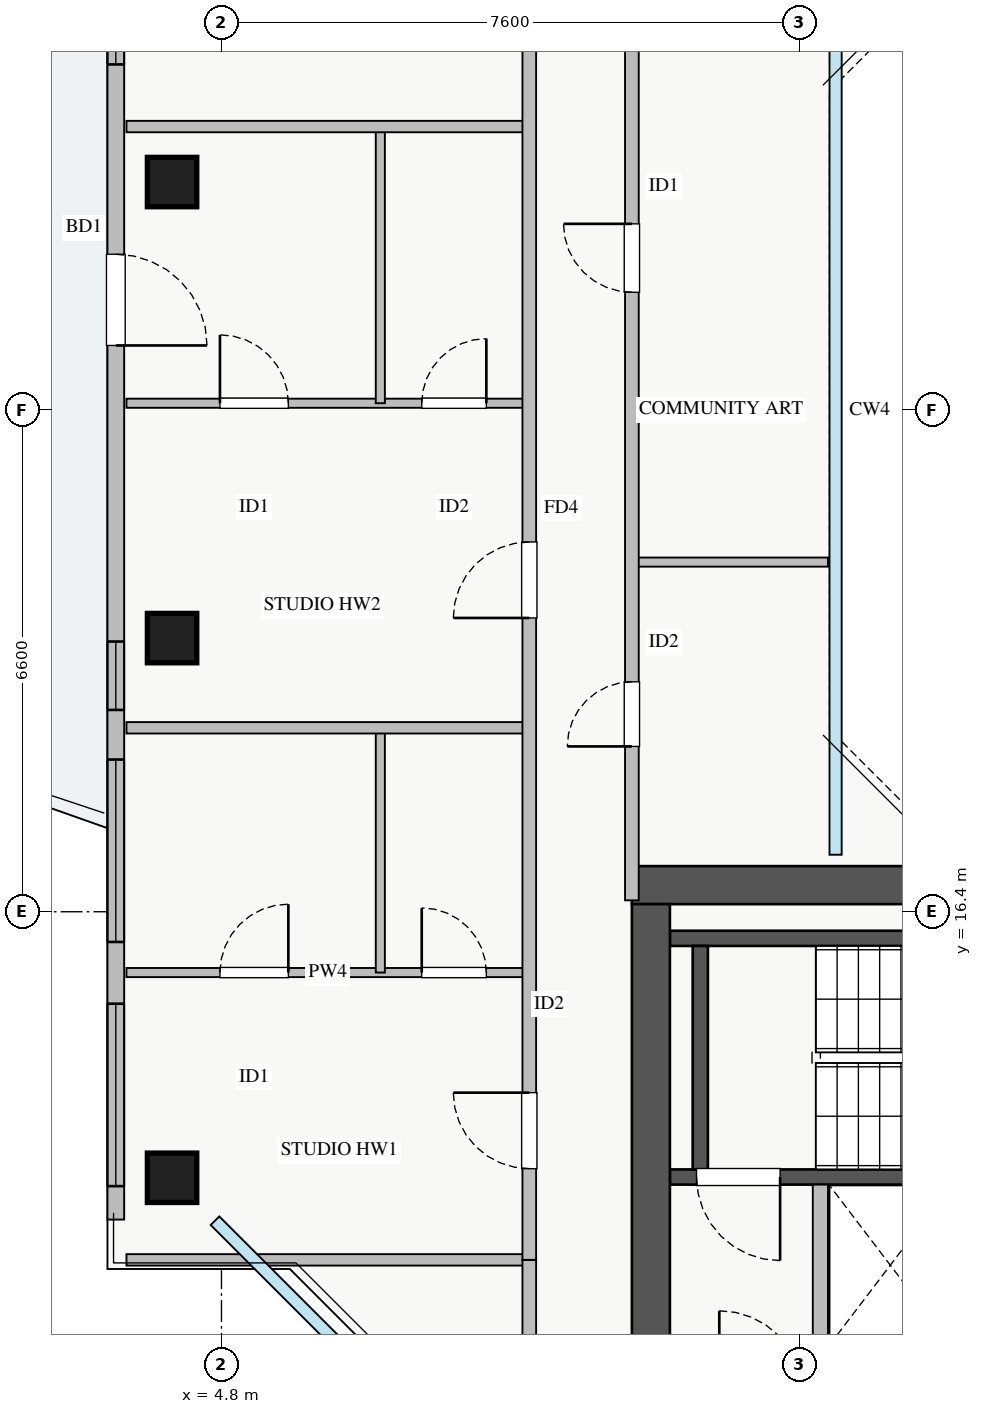
"""IFC4 building model, lengths in metres.
Left out: names, types, materials, properties, quantities, classifications, styles, units other than length and angle.
Written with IfcOpenShell. Run it as: python <this file> out.ifc"""

import sys

from ifc_helpers import new_model, si_unit, direction, frame, frame_2d, origin, origin_2d, place, context, subcontext, project, spatial, rectangle, extrude, source, transform, mapped, element, fill, save


model = new_model("IFC4")
c1 = context("Model", 3, precision=1e-05, world=origin(), true_north=direction((0.0, 1.0)))
c2 = subcontext(c1, "Body", "Model", "MODEL_VIEW")
j1 = project(units=[si_unit("LENGTHUNIT", "METRE"), si_unit("PLANEANGLEUNIT", "RADIAN")], contexts=[c1])
p1 = place(None, origin())
s1 = spatial("IfcSite", under=j1, at=p1, CompositionType="ELEMENT")
p2 = place(p1, origin())
s2 = spatial("IfcBuilding", under=s1, at=p2, CompositionType="ELEMENT")
p3 = place(p2, frame((0.0, 0.0, 260.0)))
s3 = spatial("IfcBuildingStorey", under=s2, at=p3, CompositionType="ELEMENT", Elevation=260.0)
p4 = place(p3, frame((12.68, 12.8, 0.0), z_axis=(0.0, 0.0, 1.0), x_axis=(1.0, 0.0, 0.0)))
e1 = element("IfcWall", 1, at=p4, inside=s3, PredefinedType="SHEAR", context=c2, shape_type="SweptSolid", body=[
    extrude(rectangle(XDim=1.94, YDim=0.18, at=frame_2d((0.97, 0.0))), origin(), (0.0, 0.0, 1.0), 3.03),
])
p5 = place(p3, frame((10.7, 12.91, 0.0), z_axis=(0.0, 0.0, 1.0), x_axis=(1.0, 0.0, 0.0)))
e2 = element("IfcWall", 2, at=p5, inside=s3, PredefinedType="SHEAR", context=c2, shape_type="SweptSolid", body=[
    extrude(rectangle(XDim=7.45, YDim=0.2, at=frame_2d((3.725, 0.0))), origin(), (0.0, 0.0, 1.0), 3.25),
])
p6 = place(p5, frame((0.35, 0.0, 0.0)))
e3 = element("IfcOpeningElement", 3, at=p6, cuts=e2, PredefinedType="OPENING", context=c2, shape_type="SweptSolid", body=[
    extrude(rectangle(XDim=1.1, YDim=2.05, at=frame_2d((0.55, 1.025))), frame((0.0, 0.11, 0.0), z_axis=(0.0, -1.0, 0.0), x_axis=(1.0, 0.0, 0.0)), (0.0, 0.0, 1.0), 0.22),
])
p7 = place(p3, frame((10.7, 16.05, 0.0), z_axis=(0.0, 0.0, 1.0), x_axis=(1.0, 0.0, 0.0)))
e4 = element("IfcWall", 4, at=p7, inside=s3, PredefinedType="SHEAR", context=c2, shape_type="SweptSolid", body=[
    extrude(rectangle(XDim=7.45, YDim=0.2, at=frame_2d((3.725, 0.0))), origin(), (0.0, 0.0, 1.0), 3.25),
])
p8 = place(p3, frame((11.1, 13.01, 0.0), z_axis=(0.0, 0.0, 1.0), x_axis=(0.0, 1.0, 0.0)))
e5 = element("IfcWall", 5, at=p8, inside=s3, PredefinedType="SHEAR", context=c2, shape_type="SweptSolid", body=[
    extrude(rectangle(XDim=2.94, YDim=0.2, at=frame_2d((1.47, 0.0))), origin(), (0.0, 0.0, 1.0), 3.25),
])
p9 = place(p3, frame((10.2, 16.75, 0.0), z_axis=(0.0, 0.0, 1.0), x_axis=(1.0, 0.0, 0.0)))
e6 = element("IfcWall", 6, at=p9, inside=s3, PredefinedType="SHEAR", context=c2, shape_type="SweptSolid", body=[
    extrude(rectangle(XDim=17.6, YDim=0.5, at=frame_2d((8.8, 0.0))), origin(), (0.0, 0.0, 1.0), 3.25),
])
p10 = place(p3, frame((10.45, 10.3, 0.0), z_axis=(0.0, 0.0, 1.0), x_axis=(0.0, 1.0, 0.0)))
e7 = element("IfcWall", 7, at=p10, inside=s3, PredefinedType="SHEAR", context=c2, shape_type="SweptSolid", body=[
    extrude(rectangle(XDim=6.2, YDim=0.5, at=frame_2d((3.1, 0.0))), origin(), (0.0, 0.0, 1.0), 3.25),
])
m1 = source(origin(), c2, "Body", "SweptSolid", [
    extrude(rectangle(XDim=0.65, YDim=0.65, at=origin_2d()), origin(), (0.0, 0.0, 1.0), 3.25),
])
for number, where, z_axis, x_axis in (
    (8, (4.15, 26.0, 0.0), (0.0, 0.0, 1.0), (1.0, 0.0, 0.0)),
    (9, (4.15, 20.0, 0.0), (0.0, 0.0, 1.0), (1.0, 0.0, 0.0)),
    (10, (4.15, 12.9, 0.0), (0.0, 0.0, 1.0), (1.0, 0.0, 0.0)),
):
    element("IfcColumn", number, at=place(p3, frame(where, z_axis=z_axis, x_axis=x_axis)), inside=s3, PredefinedType="COLUMN", context=c2, shape_type="MappedRepresentation", body=[
        mapped(m1, transform((0.0, 0.0, 0.0), x_axis=(1.0, 0.0, 0.0), y_axis=(0.0, 1.0, 0.0), z_axis=(0.0, 0.0, 1.0), scale=1.0)),
    ])
p11 = place(p3, frame((3.41, 12.35, 0.0), z_axis=(0.0, 0.0, 1.0), x_axis=(0.0, 1.0, 0.0)))
e11 = element("IfcWall", 11, at=p11, inside=s3, PredefinedType="STANDARD", context=c2, shape_type="SweptSolid", body=[
    extrude(rectangle(XDim=21.3, YDim=0.22, at=frame_2d((10.65, 0.0))), origin(), (0.0, 0.0, 1.0), 2.57),
])
p12 = place(p11, frame((11.5, 0.0, 0.0)))
e12 = element("IfcOpeningElement", 12, at=p12, cuts=e11, PredefinedType="OPENING", context=c2, shape_type="SweptSolid", body=[
    extrude(rectangle(XDim=1.2, YDim=2.1, at=frame_2d((0.6, 1.05))), frame((0.0, 0.12, 0.0), z_axis=(0.0, -1.0, 0.0), x_axis=(1.0, 0.0, 0.0)), (0.0, 0.0, 1.0), 0.24),
])
p13 = place(p11, frame((0.44, 0.0, 0.9)))
e13 = element("IfcOpeningElement", 13, at=p13, cuts=e11, PredefinedType="OPENING", context=c2, shape_type="SweptSolid", body=[
    extrude(rectangle(XDim=2.4, YDim=1.5, at=frame_2d((1.2, 0.75))), frame((0.0, 0.12, 0.0), z_axis=(0.0, -1.0, 0.0), x_axis=(1.0, 0.0, 0.0)), (0.0, 0.0, 1.0), 0.24),
])
p14 = place(p11, frame((18.785, 0.0, 0.9)))
e14 = element("IfcOpeningElement", 14, at=p14, cuts=e11, PredefinedType="OPENING", context=c2, shape_type="SweptSolid", body=[
    extrude(rectangle(XDim=2.1, YDim=1.5, at=frame_2d((1.05, 0.75))), frame((0.0, 0.12, 0.0), z_axis=(0.0, -1.0, 0.0), x_axis=(1.0, 0.0, 0.0)), (0.0, 0.0, 1.0), 0.24),
])
p15 = place(p11, frame((3.653, 0.0, 0.9)))
e15 = element("IfcOpeningElement", 15, at=p15, cuts=e11, PredefinedType="OPENING", context=c2, shape_type="SweptSolid", body=[
    extrude(rectangle(XDim=2.4, YDim=1.5, at=frame_2d((1.2, 0.75))), frame((0.0, 0.12, 0.0), z_axis=(0.0, -1.0, 0.0), x_axis=(1.0, 0.0, 0.0)), (0.0, 0.0, 1.0), 0.24),
])
p16 = place(p11, frame((15.198, 0.0, 0.9)))
e16 = element("IfcOpeningElement", 16, at=p16, cuts=e11, PredefinedType="OPENING", context=c2, shape_type="SweptSolid", body=[
    extrude(rectangle(XDim=2.4, YDim=1.5, at=frame_2d((1.2, 0.75))), frame((0.0, 0.12, 0.0), z_axis=(0.0, -1.0, 0.0), x_axis=(1.0, 0.0, 0.0)), (0.0, 0.0, 1.0), 0.24),
])
p17 = place(p11, frame((6.705, 0.0, 0.9)))
e17 = element("IfcOpeningElement", 17, at=p17, cuts=e11, PredefinedType="OPENING", context=c2, shape_type="SweptSolid", body=[
    extrude(rectangle(XDim=0.9, YDim=1.2, at=frame_2d((0.45, 0.6))), frame((0.0, 0.12, 0.0), z_axis=(0.0, -1.0, 0.0), x_axis=(1.0, 0.0, 0.0)), (0.0, 0.0, 1.0), 0.24),
])
p18 = place(p3, frame((12.68, 10.6, 0.0), z_axis=(0.0, 0.0, 1.0), x_axis=(0.0, 1.0, 0.0)))
e18 = element("IfcWall", 18, at=p18, inside=s3, PredefinedType="PARTITIONING", context=c2, shape_type="SweptSolid", body=[
    extrude(rectangle(XDim=2.21, YDim=0.2, at=frame_2d((1.105, 0.0))), origin(), (0.0, 0.0, 1.0), 3.03),
])
p19 = place(p3, frame((3.55, 11.82, 0.0), z_axis=(0.0, 0.0, 1.0), x_axis=(1.0, 0.0, 0.0)))
e19 = element("IfcWall", 19, at=p19, inside=s3, PredefinedType="PARTITIONING", context=c2, shape_type="SweptSolid", body=[
    extrude(rectangle(XDim=5.3, YDim=0.15, at=frame_2d((2.65, 0.0))), origin(), (0.0, 0.0, 1.0), 3.03),
])
p20 = place(p3, frame((8.85, 8.56, 0.0), z_axis=(0.0, 0.0, 1.0), x_axis=(0.0, 1.0, 0.0)))
e20 = element("IfcWall", 20, at=p20, inside=s3, PredefinedType="PARTITIONING", context=c2, shape_type="SweptSolid", body=[
    extrude(rectangle(XDim=3.26, YDim=0.18, at=frame_2d((1.63, 0.0))), origin(), (0.0, 0.0, 1.0), 2.529),
])
p21 = place(p3, frame((3.55, 15.6, 0.0), z_axis=(0.0, 0.0, 1.0), x_axis=(1.0, 0.0, 0.0)))
e21 = element("IfcWall", 21, at=p21, inside=s3, PredefinedType="PLUMBINGWALL", context=c2, shape_type="SweptSolid", body=[
    extrude(rectangle(XDim=5.3, YDim=0.12, at=frame_2d((2.65, 0.0))), origin(), (0.0, 0.0, 1.0), 3.03),
])
p22 = place(p21, frame((1.23, 0.0, 0.0)))
e22 = element("IfcOpeningElement", 22, at=p22, cuts=e21, PredefinedType="OPENING", context=c2, shape_type="SweptSolid", body=[
    extrude(rectangle(XDim=0.9, YDim=2.05, at=frame_2d((0.45, 1.025))), frame((0.0, 0.07, 0.0), z_axis=(0.0, -1.0, 0.0), x_axis=(1.0, 0.0, 0.0)), (0.0, 0.0, 1.0), 0.14),
])
p23 = place(p21, frame((3.885, 0.0, 0.0)))
e23 = element("IfcOpeningElement", 23, at=p23, cuts=e21, PredefinedType="OPENING", context=c2, shape_type="SweptSolid", body=[
    extrude(rectangle(XDim=0.85, YDim=2.05, at=frame_2d((0.425, 1.025))), frame((0.0, 0.07, 0.0), z_axis=(0.0, -1.0, 0.0), x_axis=(1.0, 0.0, 0.0)), (0.0, 0.0, 1.0), 0.14),
])
p24 = place(p3, frame((6.89, 15.6, 0.0), z_axis=(0.0, 0.0, 1.0), x_axis=(0.0, 1.0, 0.0)))
e24 = element("IfcWall", 24, at=p24, inside=s3, PredefinedType="PLUMBINGWALL", context=c2, shape_type="SweptSolid", body=[
    extrude(rectangle(XDim=3.22, YDim=0.12, at=frame_2d((1.61, 0.0))), origin(), (0.0, 0.0, 1.0), 3.03),
])
p25 = place(p3, frame((3.55, 23.09, 0.0), z_axis=(0.0, 0.0, 1.0), x_axis=(1.0, 0.0, 0.0)))
e25 = element("IfcWall", 25, at=p25, inside=s3, PredefinedType="PLUMBINGWALL", context=c2, shape_type="SweptSolid", body=[
    extrude(rectangle(XDim=5.3, YDim=0.12, at=frame_2d((2.65, 0.0))), origin(), (0.0, 0.0, 1.0), 3.03),
])
p26 = place(p25, frame((1.23, 0.0, 0.0)))
e26 = element("IfcOpeningElement", 26, at=p26, cuts=e25, PredefinedType="OPENING", context=c2, shape_type="SweptSolid", body=[
    extrude(rectangle(XDim=0.9, YDim=2.05, at=frame_2d((0.45, 1.025))), frame((0.0, 0.07, 0.0), z_axis=(0.0, -1.0, 0.0), x_axis=(1.0, 0.0, 0.0)), (0.0, 0.0, 1.0), 0.14),
])
p27 = place(p25, frame((3.885, 0.0, 0.0)))
e27 = element("IfcOpeningElement", 27, at=p27, cuts=e25, PredefinedType="OPENING", context=c2, shape_type="SweptSolid", body=[
    extrude(rectangle(XDim=0.85, YDim=2.05, at=frame_2d((0.425, 1.025))), frame((0.0, 0.07, 0.0), z_axis=(0.0, -1.0, 0.0), x_axis=(1.0, 0.0, 0.0)), (0.0, 0.0, 1.0), 0.14),
])
p28 = place(p3, frame((6.89, 23.09, 0.0), z_axis=(0.0, 0.0, 1.0), x_axis=(0.0, 1.0, 0.0)))
e28 = element("IfcWall", 28, at=p28, inside=s3, PredefinedType="PLUMBINGWALL", context=c2, shape_type="SweptSolid", body=[
    extrude(rectangle(XDim=3.64, YDim=0.12, at=frame_2d((1.82, 0.0))), origin(), (0.0, 0.0, 1.0), 3.03),
])
for number, where, z_axis, x_axis in (
    (29, (3.55, 18.82, 0.0), (0.0, 0.0, 1.0), (1.0, 0.0, 0.0)),
    (30, (3.55, 26.73, 0.0), (0.0, 0.0, 1.0), (1.0, 0.0, 0.0)),
):
    element("IfcWall", number, at=place(p3, frame(where, z_axis=z_axis, x_axis=x_axis)), inside=s3, PredefinedType="PARTITIONING", context=c2, shape_type="SweptSolid", body=[
        extrude(rectangle(XDim=5.3, YDim=0.15, at=frame_2d((2.65, 0.0))), origin(), (0.0, 0.0, 1.0), 3.03),
    ])
p29 = place(p3, frame((8.85, 11.82, 0.0), z_axis=(0.0, 0.0, 1.0), x_axis=(0.0, 1.0, 0.0)))
e31 = element("IfcWall", 31, at=p29, inside=s3, PredefinedType="PARTITIONING", context=c2, shape_type="SweptSolid", body=[
    extrude(rectangle(XDim=22.36, YDim=0.18, at=frame_2d((11.18, 0.0))), origin(), (0.0, 0.0, 1.0), 2.529),
])
p30 = place(p29, frame((1.2, 0.0, 0.0)))
e32 = element("IfcOpeningElement", 32, at=p30, cuts=e31, PredefinedType="OPENING", context=c2, shape_type="SweptSolid", body=[
    extrude(rectangle(XDim=1.0, YDim=2.05, at=frame_2d((0.5, 1.025))), frame((0.0, 0.1, 0.0), z_axis=(0.0, -1.0, 0.0), x_axis=(1.0, 0.0, 0.0)), (0.0, 0.0, 1.0), 0.2),
])
p31 = place(p29, frame((8.445, 0.0, 0.0)))
e33 = element("IfcOpeningElement", 33, at=p31, cuts=e31, PredefinedType="OPENING", context=c2, shape_type="SweptSolid", body=[
    extrude(rectangle(XDim=1.0, YDim=2.05, at=frame_2d((0.5, 1.025))), frame((0.0, 0.1, 0.0), z_axis=(0.0, -1.0, 0.0), x_axis=(1.0, 0.0, 0.0)), (0.0, 0.0, 1.0), 0.2),
])
p32 = place(p29, frame((16.23, 0.0, 0.0)))
e34 = element("IfcOpeningElement", 34, at=p32, cuts=e31, PredefinedType="OPENING", context=c2, shape_type="SweptSolid", body=[
    extrude(rectangle(XDim=1.0, YDim=2.05, at=frame_2d((0.5, 1.025))), frame((0.0, 0.1, 0.0), z_axis=(0.0, -1.0, 0.0), x_axis=(1.0, 0.0, 0.0)), (0.0, 0.0, 1.0), 0.2),
])
p33 = place(p3, frame((10.2, 21.0, 0.0), z_axis=(0.0, 0.0, 1.0), x_axis=(1.0, 0.0, 0.0)))
e35 = element("IfcWall", 35, at=p33, inside=s3, PredefinedType="PLUMBINGWALL", context=c2, shape_type="SweptSolid", body=[
    extrude(rectangle(XDim=2.58, YDim=0.12, at=frame_2d((1.29, 0.0))), origin(), (0.0, 0.0, 1.0), 3.03),
])
p34 = place(p3, frame((10.2, 16.55, 0.0), z_axis=(0.0, 0.0, 1.0), x_axis=(0.0, 1.0, 0.0)))
e36 = element("IfcWall", 36, at=p34, inside=s3, PredefinedType="PARTITIONING", context=c2, shape_type="SweptSolid", body=[
    extrude(rectangle(XDim=12.9, YDim=0.18, at=frame_2d((6.45, 0.0))), origin(), (0.0, 0.0, 1.0), 3.03),
])
p35 = place(p34, frame((2.025, 0.0, 0.0)))
e37 = element("IfcOpeningElement", 37, at=p35, cuts=e36, PredefinedType="OPENING", context=c2, shape_type="SweptSolid", body=[
    extrude(rectangle(XDim=0.85, YDim=2.05, at=frame_2d((0.425, 1.025))), frame((0.0, 0.1, 0.0), z_axis=(0.0, -1.0, 0.0), x_axis=(1.0, 0.0, 0.0)), (0.0, 0.0, 1.0), 0.2),
])
p36 = place(p34, frame((8.0, 0.0, 0.0)))
e38 = element("IfcOpeningElement", 38, at=p36, cuts=e36, PredefinedType="OPENING", context=c2, shape_type="SweptSolid", body=[
    extrude(rectangle(XDim=0.9, YDim=2.05, at=frame_2d((0.45, 1.025))), frame((0.0, 0.1, 0.0), z_axis=(0.0, -1.0, 0.0), x_axis=(1.0, 0.0, 0.0)), (0.0, 0.0, 1.0), 0.2),
])
m2 = source(origin(), c2, "Body", "SweptSolid", [
    extrude(rectangle(XDim=1.2, YDim=2.1, at=frame_2d((0.6, 1.05))), frame((0.0, 0.025, 0.0), z_axis=(0.0, -1.0, 0.0), x_axis=(1.0, 0.0, 0.0)), (0.0, 0.0, 1.0), 0.05),
])
p37 = place(p12, frame((1.2, 0.0, 0.0), z_axis=(0.0, 0.0, 1.0), x_axis=(-1.0, 0.0, 0.0)))
e39 = element("IfcDoor", 39, at=p37, inside=s3, OperationType="SINGLE_SWING_LEFT", PredefinedType="DOOR", context=c2, shape_type="MappedRepresentation", body=[
    mapped(m2, transform((0.0, 0.0, 0.0), x_axis=(1.0, 0.0, 0.0), y_axis=(0.0, 1.0, 0.0), z_axis=(0.0, 0.0, 1.0), scale=1.0)),
])
fill(e12, e39)
m3 = source(origin(), c2, "Body", "SweptSolid", [
    extrude(rectangle(XDim=2.4, YDim=1.5, at=frame_2d((1.2, 0.75))), frame((0.0, 0.03, 0.0), z_axis=(0.0, -1.0, 0.0), x_axis=(1.0, 0.0, 0.0)), (0.0, 0.0, 1.0), 0.06),
])
p38 = place(p13, origin())
e40 = element("IfcWindow", 40, at=p38, inside=s3, PartitioningType="TRIPLE_PANEL_VERTICAL", PredefinedType="WINDOW", context=c2, shape_type="MappedRepresentation", body=[
    mapped(m3, transform((0.0, 0.0, 0.0), x_axis=(1.0, 0.0, 0.0), y_axis=(0.0, 1.0, 0.0), z_axis=(0.0, 0.0, 1.0), scale=1.0)),
])
fill(e13, e40)
m4 = source(origin(), c2, "Body", "SweptSolid", [
    extrude(rectangle(XDim=1.1, YDim=2.05, at=frame_2d((0.55, 1.025))), frame((0.0, 0.025, 0.0), z_axis=(0.0, -1.0, 0.0), x_axis=(1.0, 0.0, 0.0)), (0.0, 0.0, 1.0), 0.05),
])
p39 = place(p6, frame((1.1, 0.0, 0.0), z_axis=(0.0, 0.0, 1.0), x_axis=(-1.0, 0.0, 0.0)))
e41 = element("IfcDoor", 41, at=p39, inside=s3, OperationType="SINGLE_SWING_RIGHT", PredefinedType="DOOR", context=c2, shape_type="MappedRepresentation", body=[
    mapped(m4, transform((0.0, 0.0, 0.0), x_axis=(1.0, 0.0, 0.0), y_axis=(0.0, 1.0, 0.0), z_axis=(0.0, 0.0, 1.0), scale=1.0)),
])
fill(e3, e41)
m5 = source(origin(), c2, "Body", "SweptSolid", [
    extrude(rectangle(XDim=0.9, YDim=2.05, at=frame_2d((0.45, 1.025))), frame((0.0, 0.025, 0.0), z_axis=(0.0, -1.0, 0.0), x_axis=(1.0, 0.0, 0.0)), (0.0, 0.0, 1.0), 0.05),
])
p40 = place(p22, origin())
e42 = element("IfcDoor", 42, at=p40, inside=s3, OperationType="SINGLE_SWING_RIGHT", PredefinedType="DOOR", context=c2, shape_type="MappedRepresentation", body=[
    mapped(m5, transform((0.0, 0.0, 0.0), x_axis=(1.0, 0.0, 0.0), y_axis=(0.0, 1.0, 0.0), z_axis=(0.0, 0.0, 1.0), scale=1.0)),
])
fill(e22, e42)
m6 = source(origin(), c2, "Body", "SweptSolid", [
    extrude(rectangle(XDim=0.85, YDim=2.05, at=frame_2d((0.425, 1.025))), frame((0.0, 0.025, 0.0), z_axis=(0.0, -1.0, 0.0), x_axis=(1.0, 0.0, 0.0)), (0.0, 0.0, 1.0), 0.05),
])
p41 = place(p23, origin())
e43 = element("IfcDoor", 43, at=p41, inside=s3, OperationType="SINGLE_SWING_LEFT", PredefinedType="DOOR", context=c2, shape_type="MappedRepresentation", body=[
    mapped(m6, transform((0.0, 0.0, 0.0), x_axis=(1.0, 0.0, 0.0), y_axis=(0.0, 1.0, 0.0), z_axis=(0.0, 0.0, 1.0), scale=1.0)),
])
fill(e23, e43)
p42 = place(p26, origin())
e44 = element("IfcDoor", 44, at=p42, inside=s3, OperationType="SINGLE_SWING_LEFT", PredefinedType="DOOR", context=c2, shape_type="MappedRepresentation", body=[
    mapped(m5, transform((0.0, 0.0, 0.0), x_axis=(1.0, 0.0, 0.0), y_axis=(0.0, 1.0, 0.0), z_axis=(0.0, 0.0, 1.0), scale=1.0)),
])
fill(e26, e44)
p43 = place(p27, origin())
e45 = element("IfcDoor", 45, at=p43, inside=s3, OperationType="SINGLE_SWING_RIGHT", PredefinedType="DOOR", context=c2, shape_type="MappedRepresentation", body=[
    mapped(m6, transform((0.0, 0.0, 0.0), x_axis=(1.0, 0.0, 0.0), y_axis=(0.0, 1.0, 0.0), z_axis=(0.0, 0.0, 1.0), scale=1.0)),
])
fill(e27, e45)
m7 = source(origin(), c2, "Body", "SweptSolid", [
    extrude(rectangle(XDim=1.0, YDim=2.05, at=frame_2d((0.5, 1.025))), frame((0.0, 0.025, 0.0), z_axis=(0.0, -1.0, 0.0), x_axis=(1.0, 0.0, 0.0)), (0.0, 0.0, 1.0), 0.05),
])
p44 = place(p30, origin())
e46 = element("IfcDoor", 46, at=p44, inside=s3, OperationType="SINGLE_SWING_RIGHT", PredefinedType="DOOR", context=c2, shape_type="MappedRepresentation", body=[
    mapped(m7, transform((0.0, 0.0, 0.0), x_axis=(1.0, 0.0, 0.0), y_axis=(0.0, 1.0, 0.0), z_axis=(0.0, 0.0, 1.0), scale=1.0)),
])
fill(e32, e46)
p45 = place(p31, origin())
e47 = element("IfcDoor", 47, at=p45, inside=s3, OperationType="SINGLE_SWING_LEFT", PredefinedType="DOOR", context=c2, shape_type="MappedRepresentation", body=[
    mapped(m7, transform((0.0, 0.0, 0.0), x_axis=(1.0, 0.0, 0.0), y_axis=(0.0, 1.0, 0.0), z_axis=(0.0, 0.0, 1.0), scale=1.0)),
])
fill(e33, e47)
p46 = place(p35, origin())
e48 = element("IfcDoor", 48, at=p46, inside=s3, OperationType="SINGLE_SWING_LEFT", PredefinedType="DOOR", context=c2, shape_type="MappedRepresentation", body=[
    mapped(m6, transform((0.0, 0.0, 0.0), x_axis=(1.0, 0.0, 0.0), y_axis=(0.0, 1.0, 0.0), z_axis=(0.0, 0.0, 1.0), scale=1.0)),
])
fill(e37, e48)
p47 = place(p36, origin())
e49 = element("IfcDoor", 49, at=p47, inside=s3, OperationType="SINGLE_SWING_RIGHT", PredefinedType="DOOR", context=c2, shape_type="MappedRepresentation", body=[
    mapped(m5, transform((0.0, 0.0, 0.0), x_axis=(1.0, 0.0, 0.0), y_axis=(0.0, 1.0, 0.0), z_axis=(0.0, 0.0, 1.0), scale=1.0)),
])
fill(e38, e49)
p48 = place(p15, origin())
e50 = element("IfcWindow", 50, at=p48, inside=s3, PartitioningType="TRIPLE_PANEL_VERTICAL", PredefinedType="WINDOW", context=c2, shape_type="MappedRepresentation", body=[
    mapped(m3, transform((0.0, 0.0, 0.0), x_axis=(1.0, 0.0, 0.0), y_axis=(0.0, 1.0, 0.0), z_axis=(0.0, 0.0, 1.0), scale=1.0)),
])
fill(e15, e50)
p49 = place(p16, origin())
e51 = element("IfcWindow", 51, at=p49, inside=s3, PartitioningType="TRIPLE_PANEL_VERTICAL", PredefinedType="WINDOW", context=c2, shape_type="MappedRepresentation", body=[
    mapped(m3, transform((0.0, 0.0, 0.0), x_axis=(1.0, 0.0, 0.0), y_axis=(0.0, 1.0, 0.0), z_axis=(0.0, 0.0, 1.0), scale=1.0)),
])
fill(e16, e51)
m8 = source(origin(), c2, "Body", "SweptSolid", [
    extrude(rectangle(XDim=0.9, YDim=1.2, at=frame_2d((0.45, 0.6))), frame((0.0, 0.03, 0.0), z_axis=(0.0, -1.0, 0.0), x_axis=(1.0, 0.0, 0.0)), (0.0, 0.0, 1.0), 0.06),
])
p50 = place(p17, origin())
e52 = element("IfcWindow", 52, at=p50, inside=s3, PartitioningType="SINGLE_PANEL", PredefinedType="WINDOW", context=c2, shape_type="MappedRepresentation", body=[
    mapped(m8, transform((0.0, 0.0, 0.0), x_axis=(1.0, 0.0, 0.0), y_axis=(0.0, 1.0, 0.0), z_axis=(0.0, 0.0, 1.0), scale=1.0)),
])
fill(e17, e52)
save(model, sys.argv[1])
